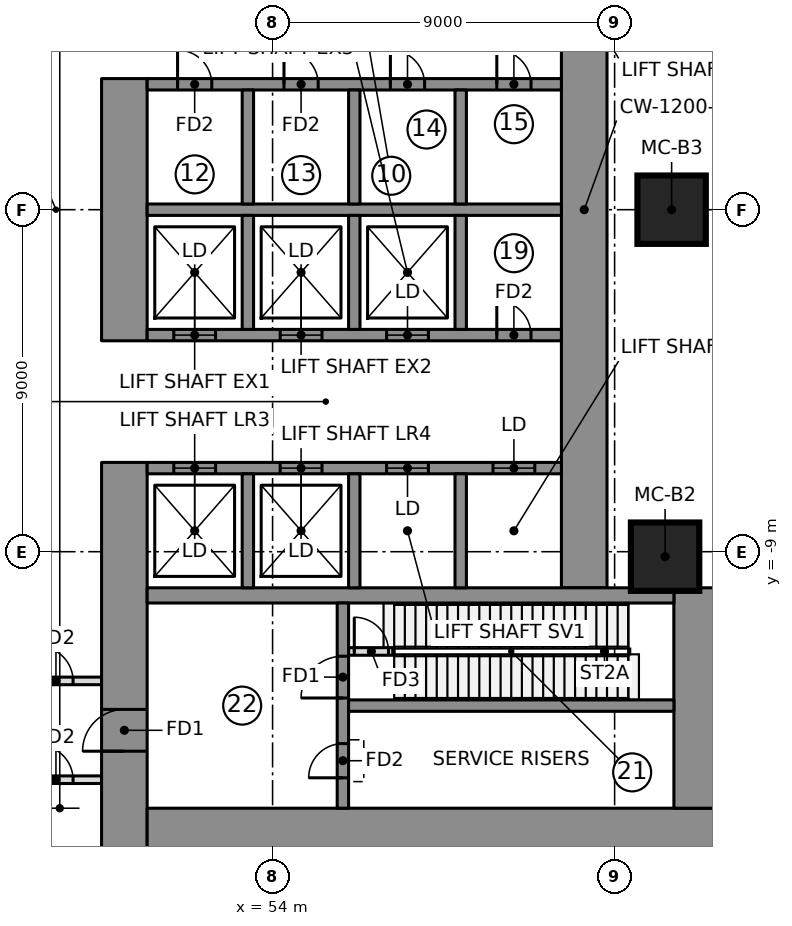
"""IFC4 building model, lengths in metres.
Left out: names, types, materials, properties, quantities, classifications, styles, units other than length and angle.
Written with IfcOpenShell. Run it as: python <this file> out.ifc"""

import sys

from ifc_helpers import new_model, si_unit, direction, frame, frame_2d, origin, origin_2d, place, context, subcontext, project, spatial, rectangle, extrude, element, fill, save


model = new_model("IFC4")
c1 = context("Model", 3, precision=1e-05, world=origin(), true_north=direction((0.0, 1.0)))
c2 = subcontext(c1, "Body", "Model", "MODEL_VIEW")
j1 = project(units=[si_unit("LENGTHUNIT", "METRE"), si_unit("PLANEANGLEUNIT", "RADIAN")], contexts=[c1])
p1 = place(None, origin())
s1 = spatial("IfcSite", under=j1, at=p1, CompositionType="ELEMENT")
p2 = place(p1, origin())
s2 = spatial("IfcBuilding", under=s1, at=p2, CompositionType="ELEMENT")
p3 = place(p2, origin())
s3 = spatial("IfcBuildingStorey", under=s2, at=p3, CompositionType="ELEMENT", Elevation=0.0)
p4 = place(p3, frame((50.1, -3.45, 0.0), z_axis=(0.0, 0.0, 1.0), x_axis=(0.0, 1.0, 0.0)))
e1 = element("IfcWall", 1, at=p4, inside=s3, PredefinedType="SHEAR", context=c2, shape_type="SweptSolid", body=[
    extrude(rectangle(XDim=6.9, YDim=1.2, at=frame_2d((3.45, 0.0))), origin(), (0.0, 0.0, 1.0), 8.0),
])
p5 = place(p3, frame((50.1, -16.95, 0.0), z_axis=(0.0, 0.0, 1.0), x_axis=(0.0, 1.0, 0.0)))
e2 = element("IfcWall", 2, at=p5, inside=s3, PredefinedType="SHEAR", context=c2, shape_type="SweptSolid", body=[
    extrude(rectangle(XDim=10.3, YDim=1.2, at=frame_2d((5.15, 0.0))), origin(), (0.0, 0.0, 1.0), 8.0),
])
p6 = place(p5, frame((2.7, 0.0, 0.0)))
e3 = element("IfcOpeningElement", 3, at=p6, cuts=e2, PredefinedType="OPENING", context=c2, shape_type="SweptSolid", body=[
    extrude(rectangle(XDim=1.1, YDim=2.1, at=frame_2d((0.55, 1.05))), frame((0.0, 0.61, 0.0), z_axis=(0.0, -1.0, 0.0), x_axis=(1.0, 0.0, 0.0)), (0.0, 0.0, 1.0), 1.22),
])
p7 = place(p3, frame((50.7, -16.35, 0.0), z_axis=(0.0, 0.0, 1.0), x_axis=(1.0, 0.0, 0.0)))
e4 = element("IfcWall", 4, at=p7, inside=s3, PredefinedType="SHEAR", context=c2, shape_type="SweptSolid", body=[
    extrude(rectangle(XDim=15.06, YDim=1.2, at=frame_2d((7.53, 0.0))), origin(), (0.0, 0.0, 1.0), 8.0),
])
p8 = place(p3, frame((65.16, -15.75, 0.0), z_axis=(0.0, 0.0, 1.0), x_axis=(0.0, 1.0, 0.0)))
e5 = element("IfcWall", 5, at=p8, inside=s3, PredefinedType="SHEAR", context=c2, shape_type="SweptSolid", body=[
    extrude(rectangle(XDim=5.8, YDim=1.2, at=frame_2d((2.9, 0.0))), origin(), (0.0, 0.0, 1.0), 8.0),
])
p9 = place(p3, frame((62.2, -9.95, 0.0), z_axis=(0.0, 0.0, 1.0), x_axis=(0.0, 1.0, 0.0)))
e6 = element("IfcWall", 6, at=p9, inside=s3, PredefinedType="SHEAR", context=c2, shape_type="SweptSolid", body=[
    extrude(rectangle(XDim=19.9, YDim=1.2, at=frame_2d((9.95, 0.0))), origin(), (0.0, 0.0, 1.0), 8.0),
])
p10 = place(p3, frame((50.7, -10.15, 0.0), z_axis=(0.0, 0.0, 1.0), x_axis=(1.0, 0.0, 0.0)))
e7 = element("IfcWall", 7, at=p10, inside=s3, PredefinedType="SHEAR", context=c2, shape_type="SweptSolid", body=[
    extrude(rectangle(XDim=13.86, YDim=0.4, at=frame_2d((6.93, 0.0))), origin(), (0.0, 0.0, 1.0), 8.0),
])
p11 = place(p3, frame((50.7, 0.0, 0.0), z_axis=(0.0, 0.0, 1.0), x_axis=(1.0, 0.0, 0.0)))
e8 = element("IfcWall", 8, at=p11, inside=s3, PredefinedType="SHEAR", context=c2, shape_type="SweptSolid", body=[
    extrude(rectangle(XDim=10.9, YDim=0.3, at=frame_2d((5.45, 0.0))), origin(), (0.0, 0.0, 1.0), 8.0),
])
p12 = place(p3, frame((50.7, 3.3, 0.0), z_axis=(0.0, 0.0, 1.0), x_axis=(1.0, 0.0, 0.0)))
e9 = element("IfcWall", 9, at=p12, inside=s3, PredefinedType="SHEAR", context=c2, shape_type="SweptSolid", body=[
    extrude(rectangle(XDim=10.9, YDim=0.3, at=frame_2d((5.45, 0.0))), origin(), (0.0, 0.0, 1.0), 8.0),
])
p13 = place(p12, frame((0.8, 0.0, 0.0)))
e10 = element("IfcOpeningElement", 10, at=p13, cuts=e9, PredefinedType="OPENING", context=c2, shape_type="SweptSolid", body=[
    extrude(rectangle(XDim=0.9, YDim=2.1, at=frame_2d((0.45, 1.05))), frame((0.0, 0.16, 0.0), z_axis=(0.0, -1.0, 0.0), x_axis=(1.0, 0.0, 0.0)), (0.0, 0.0, 1.0), 0.32),
])
p14 = place(p12, frame((3.6, 0.0, 0.0)))
e11 = element("IfcOpeningElement", 11, at=p14, cuts=e9, PredefinedType="OPENING", context=c2, shape_type="SweptSolid", body=[
    extrude(rectangle(XDim=0.9, YDim=2.1, at=frame_2d((0.45, 1.05))), frame((0.0, 0.16, 0.0), z_axis=(0.0, -1.0, 0.0), x_axis=(1.0, 0.0, 0.0)), (0.0, 0.0, 1.0), 0.32),
])
p15 = place(p12, frame((6.4, 0.0, 0.0)))
e12 = element("IfcOpeningElement", 12, at=p15, cuts=e9, PredefinedType="OPENING", context=c2, shape_type="SweptSolid", body=[
    extrude(rectangle(XDim=0.9, YDim=2.1, at=frame_2d((0.45, 1.05))), frame((0.0, 0.16, 0.0), z_axis=(0.0, -1.0, 0.0), x_axis=(1.0, 0.0, 0.0)), (0.0, 0.0, 1.0), 0.32),
])
p16 = place(p12, frame((9.2, 0.0, 0.0)))
e13 = element("IfcOpeningElement", 13, at=p16, cuts=e9, PredefinedType="OPENING", context=c2, shape_type="SweptSolid", body=[
    extrude(rectangle(XDim=0.9, YDim=2.1, at=frame_2d((0.45, 1.05))), frame((0.0, 0.16, 0.0), z_axis=(0.0, -1.0, 0.0), x_axis=(1.0, 0.0, 0.0)), (0.0, 0.0, 1.0), 0.32),
])
for number, where, z_axis, x_axis in (
    (14, (53.35, 0.15, 0.0), (0.0, 0.0, 1.0), (0.0, 1.0, 0.0)),
    (15, (56.15, 0.15, 0.0), (0.0, 0.0, 1.0), (0.0, 1.0, 0.0)),
    (16, (58.95, 0.15, 0.0), (0.0, 0.0, 1.0), (0.0, 1.0, 0.0)),
):
    element("IfcWall", number, at=place(p3, frame(where, z_axis=z_axis, x_axis=x_axis)), inside=s3, PredefinedType="SHEAR", context=c2, shape_type="SweptSolid", body=[
        extrude(rectangle(XDim=3.0, YDim=0.3, at=frame_2d((1.5, 0.0))), origin(), (0.0, 0.0, 1.0), 8.0),
    ])
p17 = place(p3, frame((50.7, -3.3, 0.0), z_axis=(0.0, 0.0, 1.0), x_axis=(1.0, 0.0, 0.0)))
e17 = element("IfcWall", 17, at=p17, inside=s3, PredefinedType="SHEAR", context=c2, shape_type="SweptSolid", body=[
    extrude(rectangle(XDim=10.9, YDim=0.3, at=frame_2d((5.45, 0.0))), origin(), (0.0, 0.0, 1.0), 8.0),
])
p18 = place(p17, frame((0.7, 0.0, 0.0)))
e18 = element("IfcOpeningElement", 18, at=p18, cuts=e17, PredefinedType="OPENING", context=c2, shape_type="SweptSolid", body=[
    extrude(rectangle(XDim=1.1, YDim=2.1, at=frame_2d((0.55, 1.05))), frame((0.0, 0.16, 0.0), z_axis=(0.0, -1.0, 0.0), x_axis=(1.0, 0.0, 0.0)), (0.0, 0.0, 1.0), 0.32),
])
p19 = place(p17, frame((3.5, 0.0, 0.0)))
e19 = element("IfcOpeningElement", 19, at=p19, cuts=e17, PredefinedType="OPENING", context=c2, shape_type="SweptSolid", body=[
    extrude(rectangle(XDim=1.1, YDim=2.1, at=frame_2d((0.55, 1.05))), frame((0.0, 0.16, 0.0), z_axis=(0.0, -1.0, 0.0), x_axis=(1.0, 0.0, 0.0)), (0.0, 0.0, 1.0), 0.32),
])
p20 = place(p17, frame((6.3, 0.0, 0.0)))
e20 = element("IfcOpeningElement", 20, at=p20, cuts=e17, PredefinedType="OPENING", context=c2, shape_type="SweptSolid", body=[
    extrude(rectangle(XDim=1.1, YDim=2.1, at=frame_2d((0.55, 1.05))), frame((0.0, 0.16, 0.0), z_axis=(0.0, -1.0, 0.0), x_axis=(1.0, 0.0, 0.0)), (0.0, 0.0, 1.0), 0.32),
])
p21 = place(p17, frame((9.2, 0.0, 0.0)))
e21 = element("IfcOpeningElement", 21, at=p21, cuts=e17, PredefinedType="OPENING", context=c2, shape_type="SweptSolid", body=[
    extrude(rectangle(XDim=0.9, YDim=2.1, at=frame_2d((0.45, 1.05))), frame((0.0, 0.16, 0.0), z_axis=(0.0, -1.0, 0.0), x_axis=(1.0, 0.0, 0.0)), (0.0, 0.0, 1.0), 0.32),
])
p22 = place(p3, frame((50.7, -6.8, 0.0), z_axis=(0.0, 0.0, 1.0), x_axis=(1.0, 0.0, 0.0)))
e22 = element("IfcWall", 22, at=p22, inside=s3, PredefinedType="SHEAR", context=c2, shape_type="SweptSolid", body=[
    extrude(rectangle(XDim=10.9, YDim=0.3, at=frame_2d((5.45, 0.0))), origin(), (0.0, 0.0, 1.0), 8.0),
])
p23 = place(p22, frame((0.7, 0.0, 0.0)))
e23 = element("IfcOpeningElement", 23, at=p23, cuts=e22, PredefinedType="OPENING", context=c2, shape_type="SweptSolid", body=[
    extrude(rectangle(XDim=1.1, YDim=2.1, at=frame_2d((0.55, 1.05))), frame((0.0, 0.16, 0.0), z_axis=(0.0, -1.0, 0.0), x_axis=(1.0, 0.0, 0.0)), (0.0, 0.0, 1.0), 0.32),
])
p24 = place(p22, frame((3.5, 0.0, 0.0)))
e24 = element("IfcOpeningElement", 24, at=p24, cuts=e22, PredefinedType="OPENING", context=c2, shape_type="SweptSolid", body=[
    extrude(rectangle(XDim=1.1, YDim=2.1, at=frame_2d((0.55, 1.05))), frame((0.0, 0.16, 0.0), z_axis=(0.0, -1.0, 0.0), x_axis=(1.0, 0.0, 0.0)), (0.0, 0.0, 1.0), 0.32),
])
p25 = place(p22, frame((6.3, 0.0, 0.0)))
e25 = element("IfcOpeningElement", 25, at=p25, cuts=e22, PredefinedType="OPENING", context=c2, shape_type="SweptSolid", body=[
    extrude(rectangle(XDim=1.1, YDim=2.1, at=frame_2d((0.55, 1.05))), frame((0.0, 0.16, 0.0), z_axis=(0.0, -1.0, 0.0), x_axis=(1.0, 0.0, 0.0)), (0.0, 0.0, 1.0), 0.32),
])
p26 = place(p22, frame((9.1, 0.0, 0.0)))
e26 = element("IfcOpeningElement", 26, at=p26, cuts=e22, PredefinedType="OPENING", context=c2, shape_type="SweptSolid", body=[
    extrude(rectangle(XDim=1.1, YDim=2.1, at=frame_2d((0.55, 1.05))), frame((0.0, 0.16, 0.0), z_axis=(0.0, -1.0, 0.0), x_axis=(1.0, 0.0, 0.0)), (0.0, 0.0, 1.0), 0.32),
])
for number, where, z_axis, x_axis in (
    (27, (53.35, -3.15, 0.0), (0.0, 0.0, 1.0), (0.0, 1.0, 0.0)),
    (28, (53.35, -9.95, 0.0), (0.0, 0.0, 1.0), (0.0, 1.0, 0.0)),
    (29, (56.15, -3.15, 0.0), (0.0, 0.0, 1.0), (0.0, 1.0, 0.0)),
    (30, (56.15, -9.95, 0.0), (0.0, 0.0, 1.0), (0.0, 1.0, 0.0)),
    (31, (58.95, -3.15, 0.0), (0.0, 0.0, 1.0), (0.0, 1.0, 0.0)),
    (32, (58.95, -9.95, 0.0), (0.0, 0.0, 1.0), (0.0, 1.0, 0.0)),
):
    element("IfcWall", number, at=place(p3, frame(where, z_axis=z_axis, x_axis=x_axis)), inside=s3, PredefinedType="SHEAR", context=c2, shape_type="SweptSolid", body=[
        extrude(rectangle(XDim=3.0, YDim=0.3, at=frame_2d((1.5, 0.0))), origin(), (0.0, 0.0, 1.0), 8.0),
    ])
p27 = place(p3, frame((55.85, -15.75, 0.0), z_axis=(0.0, 0.0, 1.0), x_axis=(0.0, 1.0, 0.0)))
e33 = element("IfcWall", 33, at=p27, inside=s3, PredefinedType="SHEAR", context=c2, shape_type="SweptSolid", body=[
    extrude(rectangle(XDim=5.4, YDim=0.3, at=frame_2d((2.7, 0.0))), origin(), (0.0, 0.0, 1.0), 8.0),
])
p28 = place(p27, frame((2.9, 0.0, 0.0)))
e34 = element("IfcOpeningElement", 34, at=p28, cuts=e33, PredefinedType="OPENING", context=c2, shape_type="SweptSolid", body=[
    extrude(rectangle(XDim=1.1, YDim=2.1, at=frame_2d((0.55, 1.05))), frame((0.0, 0.16, 0.0), z_axis=(0.0, -1.0, 0.0), x_axis=(1.0, 0.0, 0.0)), (0.0, 0.0, 1.0), 0.32),
])
p29 = place(p27, frame((0.8, 0.0, 0.0)))
e35 = element("IfcOpeningElement", 35, at=p29, cuts=e33, PredefinedType="OPENING", context=c2, shape_type="SweptSolid", body=[
    extrude(rectangle(XDim=0.9, YDim=2.1, at=frame_2d((0.45, 1.05))), frame((0.0, 0.16, 0.0), z_axis=(0.0, -1.0, 0.0), x_axis=(1.0, 0.0, 0.0)), (0.0, 0.0, 1.0), 0.32),
])
p30 = place(p3, frame((56.0, -13.05, 0.0), z_axis=(0.0, 0.0, 1.0), x_axis=(1.0, 0.0, 0.0)))
e36 = element("IfcWall", 36, at=p30, inside=s3, PredefinedType="SHEAR", context=c2, shape_type="SweptSolid", body=[
    extrude(rectangle(XDim=8.56, YDim=0.3, at=frame_2d((4.28, 0.0))), origin(), (0.0, 0.0, 1.0), 8.0),
])
for number, where, z_axis, x_axis in (
    (37, (64.328, -9.131, 0.0), (0.0, 0.0, 1.0), (1.0, 0.0, 0.0)),
    (38, (64.5, 0.0, 0.0), (0.0, 0.0, 1.0), (1.0, 0.0, 0.0)),
):
    element("IfcColumn", number, at=place(p3, frame(where, z_axis=z_axis, x_axis=x_axis)), inside=s3, PredefinedType="COLUMN", context=c2, shape_type="SweptSolid", body=[
        extrude(rectangle(XDim=1.8, YDim=1.8, at=origin_2d()), origin(), (0.0, 0.0, 1.0), 8.0),
    ])
p31 = place(p3, frame((43.4, -15.0, 0.0), z_axis=(0.0, 0.0, 1.0), x_axis=(1.0, 0.0, 0.0)))
e39 = element("IfcWall", 39, at=p31, inside=s3, PredefinedType="PARTITIONING", context=c2, shape_type="SweptSolid", body=[
    extrude(rectangle(XDim=6.1, YDim=0.2, at=frame_2d((3.05, 0.0))), origin(), (0.0, 0.0, 1.0), 7.65),
])
p32 = place(p31, frame((4.45, 0.0, 0.0)))
e40 = element("IfcOpeningElement", 40, at=p32, cuts=e39, PredefinedType="OPENING", context=c2, shape_type="SweptSolid", body=[
    extrude(rectangle(XDim=0.9, YDim=2.1, at=frame_2d((0.45, 1.05))), frame((0.0, 0.11, 0.0), z_axis=(0.0, -1.0, 0.0), x_axis=(1.0, 0.0, 0.0)), (0.0, 0.0, 1.0), 0.22),
])
p33 = place(p3, frame((43.4, -12.4, 0.0), z_axis=(0.0, 0.0, 1.0), x_axis=(1.0, 0.0, 0.0)))
e41 = element("IfcWall", 41, at=p33, inside=s3, PredefinedType="PARTITIONING", context=c2, shape_type="SweptSolid", body=[
    extrude(rectangle(XDim=6.1, YDim=0.2, at=frame_2d((3.05, 0.0))), origin(), (0.0, 0.0, 1.0), 7.65),
])
p34 = place(p33, frame((4.45, 0.0, 0.0)))
e42 = element("IfcOpeningElement", 42, at=p34, cuts=e41, PredefinedType="OPENING", context=c2, shape_type="SweptSolid", body=[
    extrude(rectangle(XDim=0.9, YDim=2.1, at=frame_2d((0.45, 1.05))), frame((0.0, 0.11, 0.0), z_axis=(0.0, -1.0, 0.0), x_axis=(1.0, 0.0, 0.0)), (0.0, 0.0, 1.0), 0.22),
])
p35 = place(p3, frame((56.0, -11.625, 0.0), z_axis=(0.0, 0.0, 1.0), x_axis=(1.0, 0.0, 0.0)))
e43 = element("IfcWall", 43, at=p35, inside=s3, PredefinedType="PARTITIONING", context=c2, shape_type="SweptSolid", body=[
    extrude(rectangle(XDim=1.2, YDim=0.2, at=frame_2d((0.6, 0.0))), origin(), (0.0, 0.0, 1.0), 7.65),
])
p36 = place(p35, frame((0.15, 0.0, 0.0)))
e44 = element("IfcOpeningElement", 44, at=p36, cuts=e43, PredefinedType="OPENING", context=c2, shape_type="SweptSolid", body=[
    extrude(rectangle(XDim=0.9, YDim=2.1, at=frame_2d((0.45, 1.05))), frame((0.0, 0.11, 0.0), z_axis=(0.0, -1.0, 0.0), x_axis=(1.0, 0.0, 0.0)), (0.0, 0.0, 1.0), 0.22),
])
p37 = place(p32, origin())
e45 = element("IfcDoor", 45, at=p37, inside=s3, OperationType="SINGLE_SWING_LEFT", PredefinedType="DOOR", context=c2, shape_type="SweptSolid", body=[
    extrude(rectangle(XDim=0.9, YDim=2.1, at=frame_2d((0.45, 1.05))), frame((0.0, 0.025, 0.0), z_axis=(0.0, -1.0, 0.0), x_axis=(1.0, 0.0, 0.0)), (0.0, 0.0, 1.0), 0.05),
])
fill(e40, e45)
p38 = place(p34, origin())
e46 = element("IfcDoor", 46, at=p38, inside=s3, OperationType="SINGLE_SWING_LEFT", PredefinedType="DOOR", context=c2, shape_type="SweptSolid", body=[
    extrude(rectangle(XDim=0.9, YDim=2.1, at=frame_2d((0.45, 1.05))), frame((0.0, 0.025, 0.0), z_axis=(0.0, -1.0, 0.0), x_axis=(1.0, 0.0, 0.0)), (0.0, 0.0, 1.0), 0.05),
])
fill(e42, e46)
p39 = place(p36, origin())
e47 = element("IfcDoor", 47, at=p39, inside=s3, OperationType="SINGLE_SWING_LEFT", PredefinedType="DOOR", context=c2, shape_type="SweptSolid", body=[
    extrude(rectangle(XDim=0.9, YDim=2.1, at=frame_2d((0.45, 1.05))), frame((0.0, 0.025, 0.0), z_axis=(0.0, -1.0, 0.0), x_axis=(1.0, 0.0, 0.0)), (0.0, 0.0, 1.0), 0.05),
])
fill(e44, e47)
p40 = place(p18, origin())
e48 = element("IfcDoor", 48, at=p40, inside=s3, OperationType="DOUBLE_DOOR_SLIDING", PredefinedType="DOOR", context=c2, shape_type="SweptSolid", body=[
    extrude(rectangle(XDim=1.1, YDim=2.1, at=frame_2d((0.55, 1.05))), frame((0.0, 0.025, 0.0), z_axis=(0.0, -1.0, 0.0), x_axis=(1.0, 0.0, 0.0)), (0.0, 0.0, 1.0), 0.05),
])
fill(e18, e48)
p41 = place(p19, origin())
e49 = element("IfcDoor", 49, at=p41, inside=s3, OperationType="DOUBLE_DOOR_SLIDING", PredefinedType="DOOR", context=c2, shape_type="SweptSolid", body=[
    extrude(rectangle(XDim=1.1, YDim=2.1, at=frame_2d((0.55, 1.05))), frame((0.0, 0.025, 0.0), z_axis=(0.0, -1.0, 0.0), x_axis=(1.0, 0.0, 0.0)), (0.0, 0.0, 1.0), 0.05),
])
fill(e19, e49)
p42 = place(p20, origin())
e50 = element("IfcDoor", 50, at=p42, inside=s3, OperationType="DOUBLE_DOOR_SLIDING", PredefinedType="DOOR", context=c2, shape_type="SweptSolid", body=[
    extrude(rectangle(XDim=1.1, YDim=2.1, at=frame_2d((0.55, 1.05))), frame((0.0, 0.025, 0.0), z_axis=(0.0, -1.0, 0.0), x_axis=(1.0, 0.0, 0.0)), (0.0, 0.0, 1.0), 0.05),
])
fill(e20, e50)
p43 = place(p23, origin())
e51 = element("IfcDoor", 51, at=p43, inside=s3, OperationType="DOUBLE_DOOR_SLIDING", PredefinedType="DOOR", context=c2, shape_type="SweptSolid", body=[
    extrude(rectangle(XDim=1.1, YDim=2.1, at=frame_2d((0.55, 1.05))), frame((0.0, 0.025, 0.0), z_axis=(0.0, -1.0, 0.0), x_axis=(1.0, 0.0, 0.0)), (0.0, 0.0, 1.0), 0.05),
])
fill(e23, e51)
p44 = place(p24, origin())
e52 = element("IfcDoor", 52, at=p44, inside=s3, OperationType="DOUBLE_DOOR_SLIDING", PredefinedType="DOOR", context=c2, shape_type="SweptSolid", body=[
    extrude(rectangle(XDim=1.1, YDim=2.1, at=frame_2d((0.55, 1.05))), frame((0.0, 0.025, 0.0), z_axis=(0.0, -1.0, 0.0), x_axis=(1.0, 0.0, 0.0)), (0.0, 0.0, 1.0), 0.05),
])
fill(e24, e52)
p45 = place(p25, origin())
e53 = element("IfcDoor", 53, at=p45, inside=s3, OperationType="DOUBLE_DOOR_SLIDING", PredefinedType="DOOR", context=c2, shape_type="SweptSolid", body=[
    extrude(rectangle(XDim=1.1, YDim=2.1, at=frame_2d((0.55, 1.05))), frame((0.0, 0.025, 0.0), z_axis=(0.0, -1.0, 0.0), x_axis=(1.0, 0.0, 0.0)), (0.0, 0.0, 1.0), 0.05),
])
fill(e25, e53)
p46 = place(p26, origin())
e54 = element("IfcDoor", 54, at=p46, inside=s3, OperationType="DOUBLE_DOOR_SLIDING", PredefinedType="DOOR", context=c2, shape_type="SweptSolid", body=[
    extrude(rectangle(XDim=1.1, YDim=2.1, at=frame_2d((0.55, 1.05))), frame((0.0, 0.025, 0.0), z_axis=(0.0, -1.0, 0.0), x_axis=(1.0, 0.0, 0.0)), (0.0, 0.0, 1.0), 0.05),
])
fill(e26, e54)
p47 = place(p28, origin())
e55 = element("IfcDoor", 55, at=p47, inside=s3, OperationType="SINGLE_SWING_RIGHT", PredefinedType="DOOR", context=c2, shape_type="SweptSolid", body=[
    extrude(rectangle(XDim=1.1, YDim=2.1, at=frame_2d((0.55, 1.05))), frame((0.0, 0.025, 0.0), z_axis=(0.0, -1.0, 0.0), x_axis=(1.0, 0.0, 0.0)), (0.0, 0.0, 1.0), 0.05),
])
fill(e34, e55)
p48 = place(p6, origin())
e56 = element("IfcDoor", 56, at=p48, inside=s3, OperationType="SINGLE_SWING_RIGHT", PredefinedType="DOOR", context=c2, shape_type="SweptSolid", body=[
    extrude(rectangle(XDim=1.1, YDim=2.1, at=frame_2d((0.55, 1.05))), frame((0.0, 0.025, 0.0), z_axis=(0.0, -1.0, 0.0), x_axis=(1.0, 0.0, 0.0)), (0.0, 0.0, 1.0), 0.05),
])
fill(e3, e56)
p49 = place(p29, origin())
e57 = element("IfcDoor", 57, at=p49, inside=s3, OperationType="SINGLE_SWING_LEFT", PredefinedType="DOOR", context=c2, shape_type="SweptSolid", body=[
    extrude(rectangle(XDim=0.9, YDim=2.1, at=frame_2d((0.45, 1.05))), frame((0.0, 0.025, 0.0), z_axis=(0.0, -1.0, 0.0), x_axis=(1.0, 0.0, 0.0)), (0.0, 0.0, 1.0), 0.05),
])
fill(e35, e57)
p50 = place(p13, origin())
e58 = element("IfcDoor", 58, at=p50, inside=s3, OperationType="SINGLE_SWING_LEFT", PredefinedType="DOOR", context=c2, shape_type="SweptSolid", body=[
    extrude(rectangle(XDim=0.9, YDim=2.1, at=frame_2d((0.45, 1.05))), frame((0.0, 0.025, 0.0), z_axis=(0.0, -1.0, 0.0), x_axis=(1.0, 0.0, 0.0)), (0.0, 0.0, 1.0), 0.05),
])
fill(e10, e58)
p51 = place(p14, origin())
e59 = element("IfcDoor", 59, at=p51, inside=s3, OperationType="SINGLE_SWING_LEFT", PredefinedType="DOOR", context=c2, shape_type="SweptSolid", body=[
    extrude(rectangle(XDim=0.9, YDim=2.1, at=frame_2d((0.45, 1.05))), frame((0.0, 0.025, 0.0), z_axis=(0.0, -1.0, 0.0), x_axis=(1.0, 0.0, 0.0)), (0.0, 0.0, 1.0), 0.05),
])
fill(e11, e59)
p52 = place(p15, origin())
e60 = element("IfcDoor", 60, at=p52, inside=s3, OperationType="SINGLE_SWING_LEFT", PredefinedType="DOOR", context=c2, shape_type="SweptSolid", body=[
    extrude(rectangle(XDim=0.9, YDim=2.1, at=frame_2d((0.45, 1.05))), frame((0.0, 0.025, 0.0), z_axis=(0.0, -1.0, 0.0), x_axis=(1.0, 0.0, 0.0)), (0.0, 0.0, 1.0), 0.05),
])
fill(e12, e60)
p53 = place(p16, origin())
e61 = element("IfcDoor", 61, at=p53, inside=s3, OperationType="SINGLE_SWING_LEFT", PredefinedType="DOOR", context=c2, shape_type="SweptSolid", body=[
    extrude(rectangle(XDim=0.9, YDim=2.1, at=frame_2d((0.45, 1.05))), frame((0.0, 0.025, 0.0), z_axis=(0.0, -1.0, 0.0), x_axis=(1.0, 0.0, 0.0)), (0.0, 0.0, 1.0), 0.05),
])
fill(e13, e61)
p54 = place(p21, origin())
e62 = element("IfcDoor", 62, at=p54, inside=s3, OperationType="SINGLE_SWING_LEFT", PredefinedType="DOOR", context=c2, shape_type="SweptSolid", body=[
    extrude(rectangle(XDim=0.9, YDim=2.1, at=frame_2d((0.45, 1.05))), frame((0.0, 0.025, 0.0), z_axis=(0.0, -1.0, 0.0), x_axis=(1.0, 0.0, 0.0)), (0.0, 0.0, 1.0), 0.05),
])
fill(e21, e62)
save(model, sys.argv[1])
